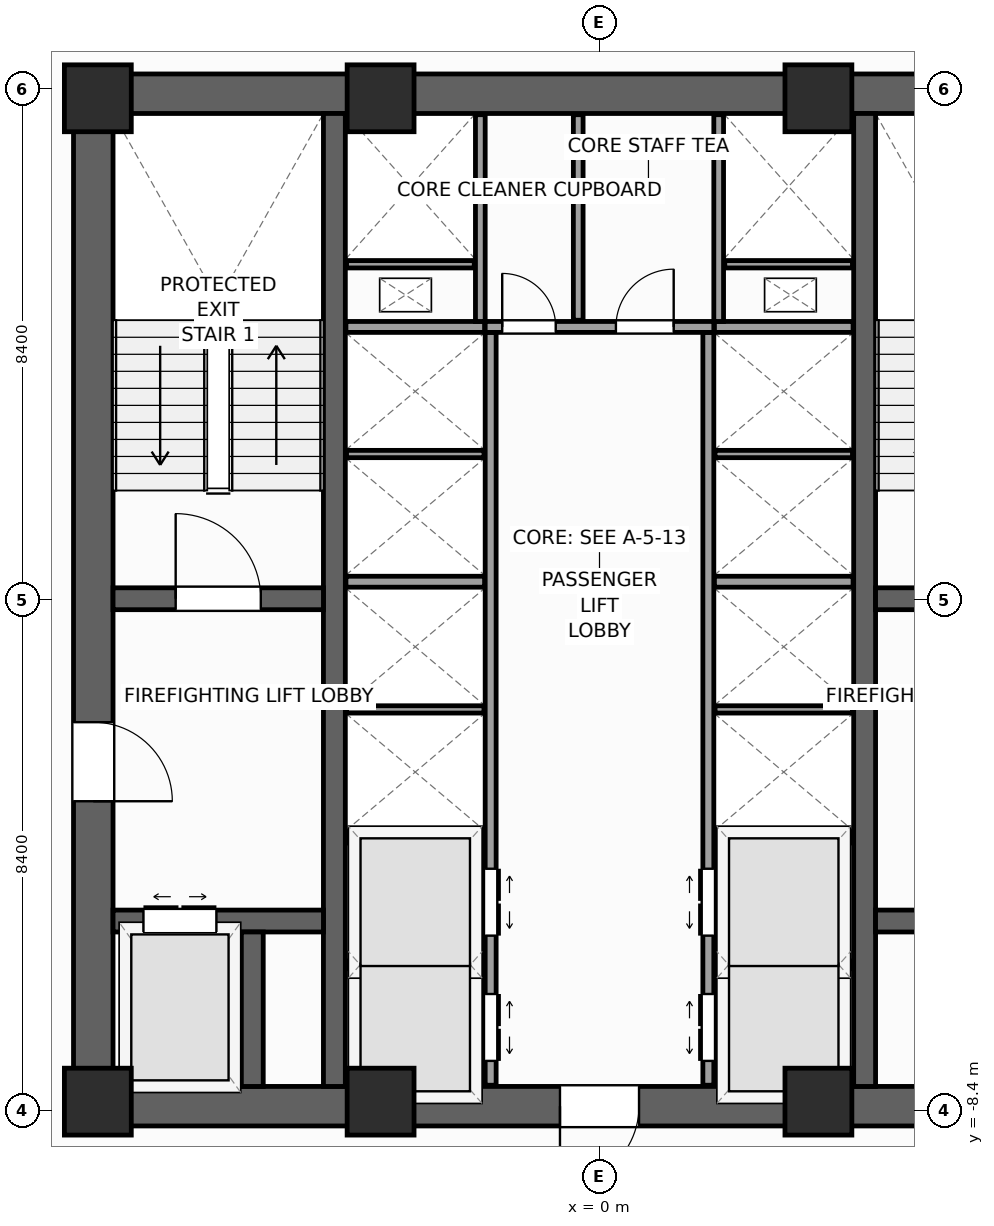
"""IFC4 building model, lengths in metres.
Left out: names, types, materials, properties, quantities, classifications, styles, units other than length and angle.
Written with IfcOpenShell. Run it as: python <this file> out.ifc"""

import sys

from ifc_helpers import new_model, si_unit, direction, frame, frame_2d, origin, origin_2d, place, context, subcontext, project, spatial, rectangle, extrude, source, transform, mapped, element, fill, save


model = new_model("IFC4")
c1 = context("Model", 3, precision=1e-05, world=origin(), true_north=direction((0.0, 1.0)))
c2 = subcontext(c1, "Body", "Model", "MODEL_VIEW")
j1 = project(units=[si_unit("LENGTHUNIT", "METRE"), si_unit("PLANEANGLEUNIT", "RADIAN")], contexts=[c1])
p1 = place(None, origin())
s1 = spatial("IfcSite", under=j1, at=p1, CompositionType="ELEMENT")
p2 = place(p1, origin())
s2 = spatial("IfcBuilding", under=s1, at=p2, CompositionType="ELEMENT")
p3 = place(p2, frame((0.0, 0.0, 115.2)))
s3 = spatial("IfcBuildingStorey", under=s2, at=p3, CompositionType="ELEMENT", Elevation=115.2)
p4 = place(p3, frame((-8.65, -8.325, 0.0), z_axis=(0.0, 0.0, 1.0), x_axis=(1.0, 0.0, 0.0)))
e1 = element("IfcWall", 1, at=p4, inside=s3, PredefinedType="SHEAR", context=c2, shape_type="SweptSolid", body=[
    extrude(rectangle(XDim=17.3, YDim=0.65, at=frame_2d((8.65, 0.0))), origin(), (0.0, 0.0, 1.0), 4.0),
])
p5 = place(p4, frame((8.0, 0.0, 0.0)))
e2 = element("IfcOpeningElement", 2, at=p5, cuts=e1, PredefinedType="OPENING", context=c2, shape_type="SweptSolid", body=[
    extrude(rectangle(XDim=1.3, YDim=2.2, at=frame_2d((0.65, 1.1))), frame((0.0, 0.335, 0.0), z_axis=(0.0, -1.0, 0.0), x_axis=(1.0, 0.0, 0.0)), (0.0, 0.0, 1.0), 0.67),
])
p6 = place(p3, frame((-8.65, 8.325, 0.0), z_axis=(0.0, 0.0, 1.0), x_axis=(1.0, 0.0, 0.0)))
e3 = element("IfcWall", 3, at=p6, inside=s3, PredefinedType="SHEAR", context=c2, shape_type="SweptSolid", body=[
    extrude(rectangle(XDim=17.3, YDim=0.65, at=frame_2d((8.65, 0.0))), origin(), (0.0, 0.0, 1.0), 4.0),
])
p7 = place(p3, frame((-8.325, -8.0, 0.0), z_axis=(0.0, 0.0, 1.0), x_axis=(0.0, 1.0, 0.0)))
e4 = element("IfcWall", 4, at=p7, inside=s3, PredefinedType="SHEAR", context=c2, shape_type="SweptSolid", body=[
    extrude(rectangle(XDim=16.0, YDim=0.65, at=frame_2d((8.0, 0.0))), origin(), (0.0, 0.0, 1.0), 4.0),
])
p8 = place(p7, frame((4.69, 0.0, 0.0)))
e5 = element("IfcOpeningElement", 5, at=p8, cuts=e4, PredefinedType="OPENING", context=c2, shape_type="SweptSolid", body=[
    extrude(rectangle(XDim=1.3, YDim=2.2, at=frame_2d((0.65, 1.1))), frame((0.0, 0.335, 0.0), z_axis=(0.0, -1.0, 0.0), x_axis=(1.0, 0.0, 0.0)), (0.0, 0.0, 1.0), 0.67),
])
for number, where, z_axis, x_axis in (
    (6, (-4.36, -8.0, 0.0), (0.0, 0.0, 1.0), (0.0, 1.0, 0.0)),
    (7, (4.36, -8.0, 0.0), (0.0, 0.0, 1.0), (0.0, 1.0, 0.0)),
):
    element("IfcWall", number, at=place(p3, frame(where, z_axis=z_axis, x_axis=x_axis)), inside=s3, PredefinedType="SHEAR", context=c2, shape_type="SweptSolid", body=[
        extrude(rectangle(XDim=16.0, YDim=0.36, at=frame_2d((8.0, 0.0))), origin(), (0.0, 0.0, 1.0), 4.0),
    ])
p9 = place(p3, frame((-8.0, 0.02, 0.0), z_axis=(0.0, 0.0, 1.0), x_axis=(1.0, 0.0, 0.0)))
e8 = element("IfcWall", 8, at=p9, inside=s3, PredefinedType="SHEAR", context=c2, shape_type="SweptSolid", body=[
    extrude(rectangle(XDim=3.46, YDim=0.36, at=frame_2d((1.73, 0.0))), origin(), (0.0, 0.0, 1.0), 4.0),
])
p10 = place(p9, frame((1.03, 0.0, 0.0)))
e9 = element("IfcOpeningElement", 9, at=p10, cuts=e8, PredefinedType="OPENING", context=c2, shape_type="SweptSolid", body=[
    extrude(rectangle(XDim=1.4, YDim=2.2, at=frame_2d((0.7, 1.1))), frame((0.0, 0.19, 0.0), z_axis=(0.0, -1.0, 0.0), x_axis=(1.0, 0.0, 0.0)), (0.0, 0.0, 1.0), 0.38),
])
p11 = place(p3, frame((4.54, 0.02, 0.0), z_axis=(0.0, 0.0, 1.0), x_axis=(1.0, 0.0, 0.0)))
e10 = element("IfcWall", 10, at=p11, inside=s3, PredefinedType="SHEAR", context=c2, shape_type="SweptSolid", body=[
    extrude(rectangle(XDim=3.46, YDim=0.36, at=frame_2d((1.73, 0.0))), origin(), (0.0, 0.0, 1.0), 4.0),
])
p12 = place(p11, frame((1.03, 0.0, 0.0)))
e11 = element("IfcOpeningElement", 11, at=p12, cuts=e10, PredefinedType="OPENING", context=c2, shape_type="SweptSolid", body=[
    extrude(rectangle(XDim=1.4, YDim=2.2, at=frame_2d((0.7, 1.1))), frame((0.0, 0.19, 0.0), z_axis=(0.0, -1.0, 0.0), x_axis=(1.0, 0.0, 0.0)), (0.0, 0.0, 1.0), 0.38),
])
p13 = place(p3, frame((-8.0, -5.28, 0.0), z_axis=(0.0, 0.0, 1.0), x_axis=(1.0, 0.0, 0.0)))
e12 = element("IfcWall", 12, at=p13, inside=s3, PredefinedType="SHEAR", context=c2, shape_type="SweptSolid", body=[
    extrude(rectangle(XDim=3.46, YDim=0.36, at=frame_2d((1.73, 0.0))), origin(), (0.0, 0.0, 1.0), 4.0),
])
p14 = place(p13, frame((0.5, 0.0, 0.0)))
e13 = element("IfcOpeningElement", 13, at=p14, cuts=e12, PredefinedType="OPENING", context=c2, shape_type="SweptSolid", body=[
    extrude(rectangle(XDim=1.2, YDim=2.25, at=frame_2d((0.6, 1.125))), frame((0.0, 0.19, 0.0), z_axis=(0.0, -1.0, 0.0), x_axis=(1.0, 0.0, 0.0)), (0.0, 0.0, 1.0), 0.38),
])
p15 = place(p3, frame((4.54, -5.28, 0.0), z_axis=(0.0, 0.0, 1.0), x_axis=(1.0, 0.0, 0.0)))
e14 = element("IfcWall", 14, at=p15, inside=s3, PredefinedType="SHEAR", context=c2, shape_type="SweptSolid", body=[
    extrude(rectangle(XDim=3.46, YDim=0.36, at=frame_2d((1.73, 0.0))), origin(), (0.0, 0.0, 1.0), 4.0),
])
p16 = place(p15, frame((1.76, 0.0, 0.0)))
e15 = element("IfcOpeningElement", 15, at=p16, cuts=e14, PredefinedType="OPENING", context=c2, shape_type="SweptSolid", body=[
    extrude(rectangle(XDim=1.2, YDim=2.25, at=frame_2d((0.6, 1.125))), frame((0.0, 0.19, 0.0), z_axis=(0.0, -1.0, 0.0), x_axis=(1.0, 0.0, 0.0)), (0.0, 0.0, 1.0), 0.38),
])
p17 = place(p3, frame((-5.71, -8.0, 0.0), z_axis=(0.0, 0.0, 1.0), x_axis=(0.0, 1.0, 0.0)))
e16 = element("IfcWall", 16, at=p17, inside=s3, PredefinedType="SHEAR", context=c2, shape_type="SweptSolid", body=[
    extrude(rectangle(XDim=2.54, YDim=0.36, at=frame_2d((1.27, 0.0))), origin(), (0.0, 0.0, 1.0), 4.0),
])
m1 = source(origin(), c2, "Body", "SweptSolid", [
    extrude(rectangle(XDim=1.1, YDim=1.1, at=origin_2d()), origin(), (0.0, 0.0, 1.0), 4.0),
])
for number, where, z_axis, x_axis in (
    (17, (-8.25, -8.25, 0.0), (0.0, 0.0, 1.0), (1.0, 0.0, 0.0)),
    (18, (-8.25, 8.25, 0.0), (0.0, 0.0, 1.0), (1.0, 0.0, 0.0)),
    (19, (-3.6, -8.25, 0.0), (0.0, 0.0, 1.0), (1.0, 0.0, 0.0)),
    (20, (3.6, -8.25, 0.0), (0.0, 0.0, 1.0), (1.0, 0.0, 0.0)),
    (21, (-3.6, 8.25, 0.0), (0.0, 0.0, 1.0), (1.0, 0.0, 0.0)),
    (22, (3.6, 8.25, 0.0), (0.0, 0.0, 1.0), (1.0, 0.0, 0.0)),
):
    element("IfcColumn", number, at=place(p3, frame(where, z_axis=z_axis, x_axis=x_axis)), inside=s3, PredefinedType="PILASTER", context=c2, shape_type="MappedRepresentation", body=[
        mapped(m1, transform((0.0, 0.0, 0.0), scale=1.0)),
    ])
p18 = place(p3, frame((-1.79, -7.98, 0.0), z_axis=(0.0, 0.0, 1.0), x_axis=(0.0, 1.0, 0.0)))
e23 = element("IfcWall", 23, at=p18, inside=s3, PredefinedType="PARTITIONING", context=c2, shape_type="SweptSolid", body=[
    extrude(rectangle(XDim=12.38, YDim=0.18, at=frame_2d((6.19, 0.0))), origin(), (0.0, 0.0, 1.0), 3.74),
])
p19 = place(p18, frame((0.4, 0.0, 0.0)))
e24 = element("IfcOpeningElement", 24, at=p19, cuts=e23, PredefinedType="OPENING", context=c2, shape_type="SweptSolid", body=[
    extrude(rectangle(XDim=1.1, YDim=2.2, at=frame_2d((0.55, 1.1))), frame((0.0, 0.1, 0.0), z_axis=(0.0, -1.0, 0.0), x_axis=(1.0, 0.0, 0.0)), (0.0, 0.0, 1.0), 0.2),
])
p20 = place(p18, frame((2.46, 0.0, 0.0)))
e25 = element("IfcOpeningElement", 25, at=p20, cuts=e23, PredefinedType="OPENING", context=c2, shape_type="SweptSolid", body=[
    extrude(rectangle(XDim=1.1, YDim=2.2, at=frame_2d((0.55, 1.1))), frame((0.0, 0.1, 0.0), z_axis=(0.0, -1.0, 0.0), x_axis=(1.0, 0.0, 0.0)), (0.0, 0.0, 1.0), 0.2),
])
p21 = place(p3, frame((1.79, -7.98, 0.0), z_axis=(0.0, 0.0, 1.0), x_axis=(0.0, 1.0, 0.0)))
e26 = element("IfcWall", 26, at=p21, inside=s3, PredefinedType="PARTITIONING", context=c2, shape_type="SweptSolid", body=[
    extrude(rectangle(XDim=12.38, YDim=0.18, at=frame_2d((6.19, 0.0))), origin(), (0.0, 0.0, 1.0), 3.74),
])
p22 = place(p21, frame((0.4, 0.0, 0.0)))
e27 = element("IfcOpeningElement", 27, at=p22, cuts=e26, PredefinedType="OPENING", context=c2, shape_type="SweptSolid", body=[
    extrude(rectangle(XDim=1.1, YDim=2.2, at=frame_2d((0.55, 1.1))), frame((0.0, 0.1, 0.0), z_axis=(0.0, -1.0, 0.0), x_axis=(1.0, 0.0, 0.0)), (0.0, 0.0, 1.0), 0.2),
])
p23 = place(p21, frame((2.46, 0.0, 0.0)))
e28 = element("IfcOpeningElement", 28, at=p23, cuts=e26, PredefinedType="OPENING", context=c2, shape_type="SweptSolid", body=[
    extrude(rectangle(XDim=1.1, YDim=2.2, at=frame_2d((0.55, 1.1))), frame((0.0, 0.1, 0.0), z_axis=(0.0, -1.0, 0.0), x_axis=(1.0, 0.0, 0.0)), (0.0, 0.0, 1.0), 0.2),
])
p24 = place(p3, frame((-1.88, 4.49, 0.0), z_axis=(0.0, 0.0, 1.0), x_axis=(1.0, 0.0, 0.0)))
e29 = element("IfcWall", 29, at=p24, inside=s3, PredefinedType="PARTITIONING", context=c2, shape_type="SweptSolid", body=[
    extrude(rectangle(XDim=3.76, YDim=0.18, at=frame_2d((1.88, 0.0))), origin(), (0.0, 0.0, 1.0), 3.74),
])
p25 = place(p24, frame((0.28, 0.0, 0.0)))
e30 = element("IfcOpeningElement", 30, at=p25, cuts=e29, PredefinedType="OPENING", context=c2, shape_type="SweptSolid", body=[
    extrude(rectangle(XDim=0.88, YDim=2.1, at=frame_2d((0.44, 1.05))), frame((0.0, 0.1, 0.0), z_axis=(0.0, -1.0, 0.0), x_axis=(1.0, 0.0, 0.0)), (0.0, 0.0, 1.0), 0.2),
])
p26 = place(p24, frame((2.15, 0.0, 0.0)))
e31 = element("IfcOpeningElement", 31, at=p26, cuts=e29, PredefinedType="OPENING", context=c2, shape_type="SweptSolid", body=[
    extrude(rectangle(XDim=0.95, YDim=2.1, at=frame_2d((0.475, 1.05))), frame((0.0, 0.1, 0.0), z_axis=(0.0, -1.0, 0.0), x_axis=(1.0, 0.0, 0.0)), (0.0, 0.0, 1.0), 0.2),
])
for number, where, z_axis, x_axis in (
    (32, (-4.17, -3.9, 0.0), (0.0, 0.0, 1.0), (1.0, 0.0, 0.0)),
    (33, (1.89, -3.9, 0.0), (0.0, 0.0, 1.0), (1.0, 0.0, 0.0)),
    (34, (-4.17, 0.3, 0.0), (0.0, 0.0, 1.0), (1.0, 0.0, 0.0)),
    (35, (1.89, 0.3, 0.0), (0.0, 0.0, 1.0), (1.0, 0.0, 0.0)),
    (36, (-4.17, 4.49, 0.0), (0.0, 0.0, 1.0), (1.0, 0.0, 0.0)),
    (37, (1.89, 4.49, 0.0), (0.0, 0.0, 1.0), (1.0, 0.0, 0.0)),
):
    element("IfcWall", number, at=place(p3, frame(where, z_axis=z_axis, x_axis=x_axis)), inside=s3, PredefinedType="PARTITIONING", context=c2, shape_type="SweptSolid", body=[
        extrude(rectangle(XDim=2.28, YDim=0.18, at=frame_2d((1.14, 0.0))), origin(), (0.0, 0.0, 1.0), 3.74),
    ])
for number, where, z_axis, x_axis in (
    (38, (-4.16, -6.0, 0.0), (0.0, 0.0, 1.0), (1.0, 0.0, 0.0)),
    (39, (1.9, -6.0, 0.0), (0.0, 0.0, 1.0), (1.0, 0.0, 0.0)),
    (40, (-4.16, -1.8, 0.0), (0.0, 0.0, 1.0), (1.0, 0.0, 0.0)),
    (41, (1.9, -1.8, 0.0), (0.0, 0.0, 1.0), (1.0, 0.0, 0.0)),
    (42, (-4.16, 2.4, 0.0), (0.0, 0.0, 1.0), (1.0, 0.0, 0.0)),
    (43, (1.9, 2.4, 0.0), (0.0, 0.0, 1.0), (1.0, 0.0, 0.0)),
):
    element("IfcWall", number, at=place(p3, frame(where, z_axis=z_axis, x_axis=x_axis)), inside=s3, PredefinedType="PARTITIONING", context=c2, shape_type="SweptSolid", body=[
        extrude(rectangle(XDim=2.26, YDim=0.12, at=frame_2d((1.13, 0.0))), origin(), (0.0, 0.0, 1.0), 3.74),
    ])
for number, where, z_axis, x_axis in (
    (44, (-1.96, 4.58, 0.0), (0.0, 0.0, 1.0), (0.0, 1.0, 0.0)),
    (45, (1.96, 4.58, 0.0), (0.0, 0.0, 1.0), (0.0, 1.0, 0.0)),
):
    element("IfcWall", number, at=place(p3, frame(where, z_axis=z_axis, x_axis=x_axis)), inside=s3, PredefinedType="PARTITIONING", context=c2, shape_type="SweptSolid", body=[
        extrude(rectangle(XDim=3.4, YDim=0.16, at=frame_2d((1.7, 0.0))), origin(), (0.0, 0.0, 1.0), 3.74),
    ])
for number, where, z_axis, x_axis in (
    (46, (-4.16, 5.52, 0.0), (0.0, 0.0, 1.0), (1.0, 0.0, 0.0)),
    (47, (2.06, 5.52, 0.0), (0.0, 0.0, 1.0), (1.0, 0.0, 0.0)),
):
    element("IfcWall", number, at=place(p3, frame(where, z_axis=z_axis, x_axis=x_axis)), inside=s3, PredefinedType="PARTITIONING", context=c2, shape_type="SweptSolid", body=[
        extrude(rectangle(XDim=2.1, YDim=0.12, at=frame_2d((1.05, 0.0))), origin(), (0.0, 0.0, 1.0), 3.74),
    ])
p27 = place(p3, frame((-0.35, 4.6, 0.0), z_axis=(0.0, 0.0, 1.0), x_axis=(0.0, 1.0, 0.0)))
e48 = element("IfcWall", 48, at=p27, inside=s3, PredefinedType="PARTITIONING", context=c2, shape_type="SweptSolid", body=[
    extrude(rectangle(XDim=3.38, YDim=0.16, at=frame_2d((1.69, 0.0))), origin(), (0.0, 0.0, 1.0), 3.74),
])
m2 = source(origin(), c2, "Body", "SweptSolid", [
    extrude(rectangle(XDim=1.4, YDim=2.2, at=frame_2d((0.7, 1.1))), frame((0.0, 0.025, 0.0), z_axis=(0.0, -1.0, 0.0), x_axis=(1.0, 0.0, 0.0)), (0.0, 0.0, 1.0), 0.05),
])
p28 = place(p10, origin())
e49 = element("IfcDoor", 49, at=p28, inside=s3, OperationType="SINGLE_SWING_LEFT", PredefinedType="DOOR", context=c2, shape_type="MappedRepresentation", body=[
    mapped(m2, transform((0.0, 0.0, 0.0), scale=1.0)),
])
fill(e9, e49)
m3 = source(origin(), c2, "Body", "SweptSolid", [
    extrude(rectangle(XDim=1.3, YDim=2.2, at=frame_2d((0.65, 1.1))), frame((0.0, 0.025, 0.0), z_axis=(0.0, -1.0, 0.0), x_axis=(1.0, 0.0, 0.0)), (0.0, 0.0, 1.0), 0.05),
])
p29 = place(p8, frame((1.3, 0.0, 0.0), z_axis=(0.0, 0.0, 1.0), x_axis=(-1.0, 0.0, 0.0)))
e50 = element("IfcDoor", 50, at=p29, inside=s3, OperationType="SINGLE_SWING_LEFT", PredefinedType="DOOR", context=c2, shape_type="MappedRepresentation", body=[
    mapped(m3, transform((0.0, 0.0, 0.0), scale=1.0)),
])
fill(e5, e50)
p30 = place(p5, frame((1.3, 0.0, 0.0), z_axis=(0.0, 0.0, 1.0), x_axis=(-1.0, 0.0, 0.0)))
e51 = element("IfcDoor", 51, at=p30, inside=s3, OperationType="SINGLE_SWING_LEFT", PredefinedType="DOOR", context=c2, shape_type="MappedRepresentation", body=[
    mapped(m3, transform((0.0, 0.0, 0.0), scale=1.0)),
])
fill(e2, e51)
m4 = source(origin(), c2, "Body", "SweptSolid", [
    extrude(rectangle(XDim=1.2, YDim=2.25, at=frame_2d((0.6, 1.125))), frame((0.0, 0.025, 0.0), z_axis=(0.0, -1.0, 0.0), x_axis=(1.0, 0.0, 0.0)), (0.0, 0.0, 1.0), 0.05),
])
p31 = place(p14, origin())
e52 = element("IfcDoor", 52, at=p31, inside=s3, OperationType="DOUBLE_DOOR_SLIDING", PredefinedType="DOOR", context=c2, shape_type="MappedRepresentation", body=[
    mapped(m4, transform((0.0, 0.0, 0.0), scale=1.0)),
])
fill(e13, e52)
m5 = source(origin(), c2, "Body", "SweptSolid", [
    extrude(rectangle(XDim=1.1, YDim=2.2, at=frame_2d((0.55, 1.1))), frame((0.0, 0.025, 0.0), z_axis=(0.0, -1.0, 0.0), x_axis=(1.0, 0.0, 0.0)), (0.0, 0.0, 1.0), 0.05),
])
p32 = place(p19, frame((1.1, 0.0, 0.0), z_axis=(0.0, 0.0, 1.0), x_axis=(-1.0, 0.0, 0.0)))
e53 = element("IfcDoor", 53, at=p32, inside=s3, OperationType="DOUBLE_DOOR_SLIDING", PredefinedType="DOOR", context=c2, shape_type="MappedRepresentation", body=[
    mapped(m5, transform((0.0, 0.0, 0.0), scale=1.0)),
])
fill(e24, e53)
p33 = place(p20, frame((1.1, 0.0, 0.0), z_axis=(0.0, 0.0, 1.0), x_axis=(-1.0, 0.0, 0.0)))
e54 = element("IfcDoor", 54, at=p33, inside=s3, OperationType="DOUBLE_DOOR_SLIDING", PredefinedType="DOOR", context=c2, shape_type="MappedRepresentation", body=[
    mapped(m5, transform((0.0, 0.0, 0.0), scale=1.0)),
])
fill(e25, e54)
p34 = place(p22, origin())
e55 = element("IfcDoor", 55, at=p34, inside=s3, OperationType="DOUBLE_DOOR_SLIDING", PredefinedType="DOOR", context=c2, shape_type="MappedRepresentation", body=[
    mapped(m5, transform((0.0, 0.0, 0.0), scale=1.0)),
])
fill(e27, e55)
p35 = place(p23, origin())
e56 = element("IfcDoor", 56, at=p35, inside=s3, OperationType="DOUBLE_DOOR_SLIDING", PredefinedType="DOOR", context=c2, shape_type="MappedRepresentation", body=[
    mapped(m5, transform((0.0, 0.0, 0.0), scale=1.0)),
])
fill(e28, e56)
m6 = source(origin(), c2, "Body", "SweptSolid", [
    extrude(rectangle(XDim=0.88, YDim=2.1, at=frame_2d((0.44, 1.05))), frame((0.0, 0.025, 0.0), z_axis=(0.0, -1.0, 0.0), x_axis=(1.0, 0.0, 0.0)), (0.0, 0.0, 1.0), 0.05),
])
p36 = place(p25, origin())
e57 = element("IfcDoor", 57, at=p36, inside=s3, OperationType="SINGLE_SWING_LEFT", PredefinedType="DOOR", context=c2, shape_type="MappedRepresentation", body=[
    mapped(m6, transform((0.0, 0.0, 0.0), scale=1.0)),
])
fill(e30, e57)
m7 = source(origin(), c2, "Body", "SweptSolid", [
    extrude(rectangle(XDim=0.95, YDim=2.1, at=frame_2d((0.475, 1.05))), frame((0.0, 0.025, 0.0), z_axis=(0.0, -1.0, 0.0), x_axis=(1.0, 0.0, 0.0)), (0.0, 0.0, 1.0), 0.05),
])
p37 = place(p26, origin())
e58 = element("IfcDoor", 58, at=p37, inside=s3, OperationType="SINGLE_SWING_RIGHT", PredefinedType="DOOR", context=c2, shape_type="MappedRepresentation", body=[
    mapped(m7, transform((0.0, 0.0, 0.0), scale=1.0)),
])
fill(e31, e58)
save(model, sys.argv[1])
